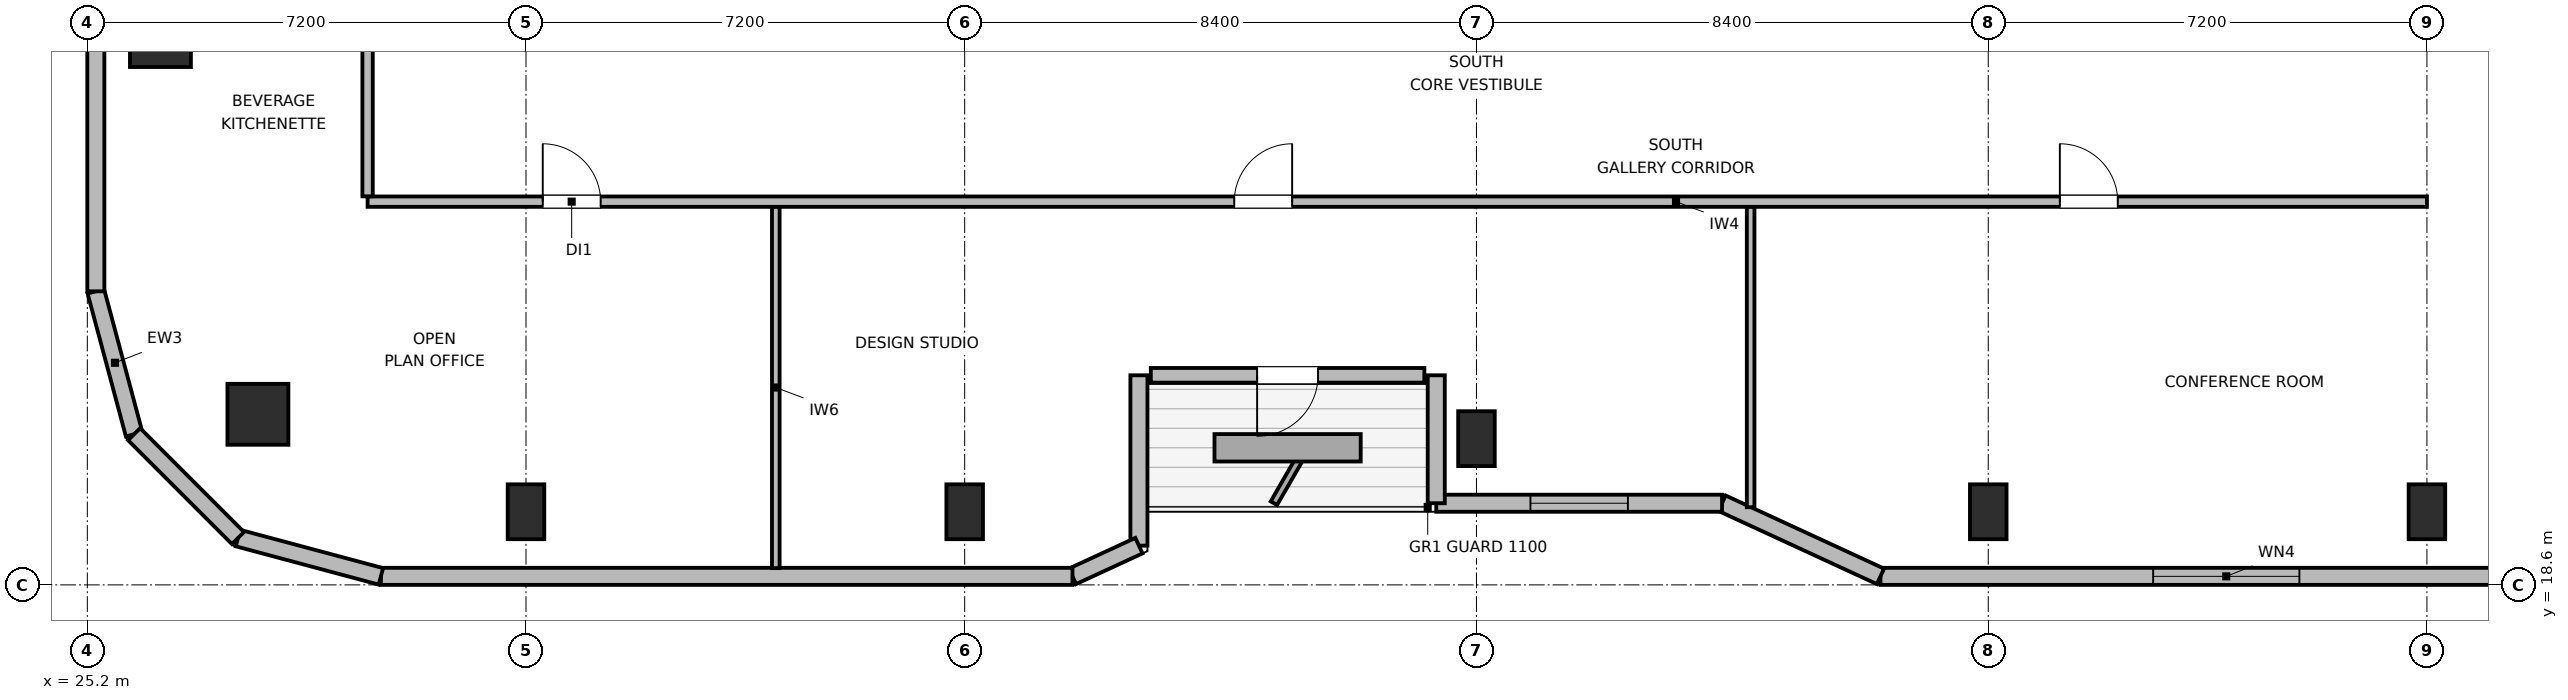
"""IFC4 building model, lengths in metres.
Left out: names, types, materials, properties, quantities, classifications, styles, units other than length and angle.
Written with IfcOpenShell. Run it as: python <this file> out.ifc"""

import sys

from ifc_helpers import new_model, si_unit, direction, frame, frame_2d, origin, origin_2d, place, context, subcontext, project, spatial, rectangle, circle, extrude, element, fill, save


model = new_model("IFC4")
c1 = context("Model", 3, precision=1e-05, world=origin(), true_north=direction((0.0, 1.0)))
c2 = subcontext(c1, "Body", "Model", "MODEL_VIEW")
j1 = project(units=[si_unit("LENGTHUNIT", "METRE"), si_unit("PLANEANGLEUNIT", "RADIAN")], contexts=[c1])
p1 = place(None, origin())
s1 = spatial("IfcSite", under=j1, at=p1, CompositionType="ELEMENT")
p2 = place(p1, origin())
s2 = spatial("IfcBuilding", under=s1, at=p2, CompositionType="ELEMENT")
p3 = place(p2, frame((0.0, 0.0, 258.9)))
s3 = spatial("IfcBuildingStorey", under=s2, at=p3, CompositionType="ELEMENT", Elevation=258.9)
p4 = place(p3, frame((28.0, 21.4, 0.0), z_axis=(0.0, 0.0, 1.0), x_axis=(1.0, 0.0, 0.0)))
e1 = element("IfcColumn", 1, at=p4, inside=s3, PredefinedType="COLUMN", context=c2, shape_type="SweptSolid", body=[
    extrude(circle(Radius=0.5, at=origin_2d()), origin(), (0.0, 0.0, 1.0), 3.9),
])
for number, where, z_axis, x_axis in (
    (2, (32.4, 19.8, 0.0), (0.0, 0.0, 1.0), (1.0, 0.0, 0.0)),
    (3, (39.6, 19.8, 0.0), (0.0, 0.0, 1.0), (1.0, 0.0, 0.0)),
    (4, (48.0, 21.0, 0.0), (0.0, 0.0, 1.0), (1.0, 0.0, 0.0)),
    (5, (56.4, 19.8, 0.0), (0.0, 0.0, 1.0), (1.0, 0.0, 0.0)),
    (6, (63.6, 19.8, 0.0), (0.0, 0.0, 1.0), (1.0, 0.0, 0.0)),
):
    element("IfcColumn", number, at=place(p3, frame(where, z_axis=z_axis, x_axis=x_axis)), inside=s3, PredefinedType="COLUMN", context=c2, shape_type="SweptSolid", body=[
        extrude(rectangle(XDim=0.6, YDim=0.9, at=origin_2d()), origin(), (0.0, 0.0, 1.0), 3.9),
    ])
p5 = place(p3, frame((26.4, 27.6, 0.0), z_axis=(0.0, 0.0, 1.0), x_axis=(1.0, 0.0, 0.0)))
e7 = element("IfcColumn", 7, at=p5, inside=s3, PredefinedType="COLUMN", context=c2, shape_type="SweptSolid", body=[
    extrude(rectangle(XDim=1.0, YDim=1.0, at=origin_2d()), origin(), (0.0, 0.0, 1.0), 3.9),
])
p6 = place(p3, frame((25.969, 21.073, 0.0), z_axis=(0.0, 0.0, 1.0), x_axis=(-0.258751159445, 0.965944013639, 0.0)))
e8 = element("IfcWall", 8, at=p6, inside=s3, PredefinedType="SOLIDWALL", context=c2, shape_type="SweptSolid", body=[
    extrude(rectangle(XDim=2.429, YDim=0.28, at=frame_2d((1.214, 0.0))), origin(), (0.0, 0.0, 1.0), 3.68),
])
p7 = place(p3, frame((25.34, 23.418, 0.0), z_axis=(0.0, 0.0, 1.0), x_axis=(0.0, 1.0, 0.0)))
e9 = element("IfcWall", 9, at=p7, inside=s3, PredefinedType="SOLIDWALL", context=c2, shape_type="SweptSolid", body=[
    extrude(rectangle(XDim=5.842, YDim=0.28, at=frame_2d((2.921, 0.0))), origin(), (0.0, 0.0, 1.0), 3.68),
])
p8 = place(p3, frame((65.982, 18.74, 0.0), z_axis=(0.0, 0.0, 1.0), x_axis=(-1.0, 0.0, 0.0)))
e10 = element("IfcWall", 10, at=p8, inside=s3, PredefinedType="SOLIDWALL", context=c2, shape_type="SweptSolid", body=[
    extrude(rectangle(XDim=11.351, YDim=0.28, at=frame_2d((5.676, 0.0))), origin(), (0.0, 0.0, 1.0), 3.68),
])
p9 = place(p8, frame((4.475, 0.0, 0.85)))
e11 = element("IfcOpeningElement", 11, at=p9, cuts=e10, PredefinedType="OPENING", context=c2, shape_type="SweptSolid", body=[
    extrude(rectangle(XDim=2.4, YDim=1.15, at=frame_2d((1.2, 0.575))), frame((0.0, 0.15, 0.0), z_axis=(0.0, -1.0, 0.0), x_axis=(1.0, 0.0, 0.0)), (0.0, 0.0, 1.0), 0.3),
])
p10 = place(p3, frame((54.631, 18.74, 0.0), z_axis=(0.0, 0.0, 1.0), x_axis=(-0.907956889006, 0.419063584324, 0.0)))
e12 = element("IfcWall", 12, at=p10, inside=s3, PredefinedType="SOLIDWALL", context=c2, shape_type="SweptSolid", body=[
    extrude(rectangle(XDim=2.864, YDim=0.28, at=frame_2d((1.432, 0.0))), origin(), (0.0, 0.0, 1.0), 2.265),
])
p11 = place(p3, frame((52.031, 19.94, 0.0), z_axis=(0.0, 0.0, 1.0), x_axis=(-1.0, 0.0, 0.0)))
e13 = element("IfcWall", 13, at=p11, inside=s3, PredefinedType="SOLIDWALL", context=c2, shape_type="SweptSolid", body=[
    extrude(rectangle(XDim=4.691, YDim=0.28, at=frame_2d((2.345, 0.0))), origin(), (0.0, 0.0, 1.0), 2.265),
])
p12 = place(p11, frame((1.545, 0.0, 0.85)))
e14 = element("IfcOpeningElement", 14, at=p12, cuts=e13, PredefinedType="OPENING", context=c2, shape_type="SweptSolid", body=[
    extrude(rectangle(XDim=1.6, YDim=1.0, at=frame_2d((0.8, 0.5))), frame((0.0, 0.15, 0.0), z_axis=(0.0, -1.0, 0.0), x_axis=(1.0, 0.0, 0.0)), (0.0, 0.0, 1.0), 0.3),
])
p13 = place(p3, frame((47.34, 19.94, 0.0), z_axis=(0.0, 0.0, 1.0), x_axis=(0.0, 1.0, 0.0)))
e15 = element("IfcWall", 15, at=p13, inside=s3, PredefinedType="SOLIDWALL", context=c2, shape_type="SweptSolid", body=[
    extrude(rectangle(XDim=2.1, YDim=0.28, at=frame_2d((1.05, 0.0))), origin(), (0.0, 0.0, 1.0), 2.265),
])
p14 = place(p3, frame((47.145, 22.04, 0.0), z_axis=(0.0, 0.0, 1.0), x_axis=(-1.0, 0.0, 0.0)))
e16 = element("IfcWall", 16, at=p14, inside=s3, PredefinedType="SOLIDWALL", context=c2, shape_type="SweptSolid", body=[
    extrude(rectangle(XDim=4.49, YDim=0.24, at=frame_2d((2.245, 0.0))), origin(), (0.0, 0.0, 1.0), 3.68),
])
p15 = place(p14, frame((1.745, 0.0, 0.0)))
e17 = element("IfcOpeningElement", 17, at=p15, cuts=e16, PredefinedType="OPENING", context=c2, shape_type="SweptSolid", body=[
    extrude(rectangle(XDim=1.0, YDim=2.02, at=frame_2d((0.5, 1.01))), frame((0.0, 0.13, 0.0), z_axis=(0.0, -1.0, 0.0), x_axis=(1.0, 0.0, 0.0)), (0.0, 0.0, 1.0), 0.26),
])
p16 = place(p3, frame((42.46, 22.04, 0.0), z_axis=(0.0, 0.0, 1.0), x_axis=(0.0, -1.0, 0.0)))
e18 = element("IfcWall", 18, at=p16, inside=s3, PredefinedType="SOLIDWALL", context=c2, shape_type="SweptSolid", body=[
    extrude(rectangle(XDim=2.796, YDim=0.28, at=frame_2d((1.398, 0.0))), origin(), (0.0, 0.0, 1.0), 2.265),
])
p17 = place(p3, frame((42.46, 19.244, 0.0), z_axis=(0.0, 0.0, 1.0), x_axis=(-0.907893953211, -0.419199916176, 0.0)))
e19 = element("IfcWall", 19, at=p17, inside=s3, PredefinedType="SOLIDWALL", context=c2, shape_type="SweptSolid", body=[
    extrude(rectangle(XDim=1.201, YDim=0.28, at=frame_2d((0.601, 0.0))), origin(), (0.0, 0.0, 1.0), 3.68),
])
p18 = place(p3, frame((41.369, 18.74, 0.0), z_axis=(0.0, 0.0, 1.0), x_axis=(-1.0, 0.0, 0.0)))
e20 = element("IfcWall", 20, at=p18, inside=s3, PredefinedType="SOLIDWALL", context=c2, shape_type="SweptSolid", body=[
    extrude(rectangle(XDim=11.351, YDim=0.28, at=frame_2d((5.675, 0.0))), origin(), (0.0, 0.0, 1.0), 3.68),
])
p19 = place(p3, frame((30.018, 18.74, 0.0), z_axis=(0.0, 0.0, 1.0), x_axis=(-0.965937282298, 0.25877628691, 0.0)))
e21 = element("IfcWall", 21, at=p19, inside=s3, PredefinedType="SOLIDWALL", context=c2, shape_type="SweptSolid", body=[
    extrude(rectangle(XDim=2.428, YDim=0.28, at=frame_2d((1.214, 0.0))), origin(), (0.0, 0.0, 1.0), 3.68),
])
p20 = place(p3, frame((27.673, 19.368, 0.0), z_axis=(0.0, 0.0, 1.0), x_axis=(-0.707106781187, 0.707106781187, 0.0)))
e22 = element("IfcWall", 22, at=p20, inside=s3, PredefinedType="SOLIDWALL", context=c2, shape_type="SweptSolid", body=[
    extrude(rectangle(XDim=2.41, YDim=0.28, at=frame_2d((1.205, 0.0))), origin(), (0.0, 0.0, 1.0), 3.68),
])
p21 = place(p3, frame((29.8, 24.89, 0.0), z_axis=(0.0, 0.0, 1.0), x_axis=(1.0, 0.0, 0.0)))
e23 = element("IfcWall", 23, at=p21, inside=s3, PredefinedType="PARTITIONING", context=c2, shape_type="SweptSolid", body=[
    extrude(rectangle(XDim=33.8, YDim=0.17, at=frame_2d((16.9, 0.0))), origin(), (0.0, 0.0, 1.0), 3.68),
])
p22 = place(p21, frame((2.875, 0.0, 0.0)))
e24 = element("IfcOpeningElement", 24, at=p22, cuts=e23, PredefinedType="OPENING", context=c2, shape_type="SweptSolid", body=[
    extrude(rectangle(XDim=0.95, YDim=2.04, at=frame_2d((0.475, 1.02))), frame((0.0, 0.095, 0.0), z_axis=(0.0, -1.0, 0.0), x_axis=(1.0, 0.0, 0.0)), (0.0, 0.0, 1.0), 0.19),
])
p23 = place(p21, frame((14.225, 0.0, 0.0)))
e25 = element("IfcOpeningElement", 25, at=p23, cuts=e23, PredefinedType="OPENING", context=c2, shape_type="SweptSolid", body=[
    extrude(rectangle(XDim=0.95, YDim=2.04, at=frame_2d((0.475, 1.02))), frame((0.0, 0.095, 0.0), z_axis=(0.0, -1.0, 0.0), x_axis=(1.0, 0.0, 0.0)), (0.0, 0.0, 1.0), 0.19),
])
p24 = place(p21, frame((27.775, 0.0, 0.0)))
e26 = element("IfcOpeningElement", 26, at=p24, cuts=e23, PredefinedType="OPENING", context=c2, shape_type="SweptSolid", body=[
    extrude(rectangle(XDim=0.95, YDim=2.04, at=frame_2d((0.475, 1.02))), frame((0.0, 0.095, 0.0), z_axis=(0.0, -1.0, 0.0), x_axis=(1.0, 0.0, 0.0)), (0.0, 0.0, 1.0), 0.19),
])
p25 = place(p3, frame((29.8, 24.977, 0.0), z_axis=(0.0, 0.0, 1.0), x_axis=(0.0, 1.0, 0.0)))
e27 = element("IfcWall", 27, at=p25, inside=s3, PredefinedType="PARTITIONING", context=c2, shape_type="SweptSolid", body=[
    extrude(rectangle(XDim=22.046, YDim=0.17, at=frame_2d((11.023, 0.0))), origin(), (0.0, 0.0, 1.0), 3.68),
])
p26 = place(p25, frame((3.693, 0.0, 0.0)))
e28 = element("IfcOpeningElement", 28, at=p26, cuts=e27, PredefinedType="OPENING", context=c2, shape_type="SweptSolid", body=[
    extrude(rectangle(XDim=0.95, YDim=2.04, at=frame_2d((0.475, 1.02))), frame((0.0, 0.095, 0.0), z_axis=(0.0, -1.0, 0.0), x_axis=(1.0, 0.0, 0.0)), (0.0, 0.0, 1.0), 0.19),
])
p27 = place(p25, frame((11.148, 0.0, 0.0)))
e29 = element("IfcOpeningElement", 29, at=p27, cuts=e27, PredefinedType="OPENING", context=c2, shape_type="SweptSolid", body=[
    extrude(rectangle(XDim=0.95, YDim=2.04, at=frame_2d((0.475, 1.02))), frame((0.0, 0.095, 0.0), z_axis=(0.0, -1.0, 0.0), x_axis=(1.0, 0.0, 0.0)), (0.0, 0.0, 1.0), 0.19),
])
p28 = place(p25, frame((18.003, 0.0, 0.0)))
e30 = element("IfcOpeningElement", 30, at=p28, cuts=e27, PredefinedType="OPENING", context=c2, shape_type="SweptSolid", body=[
    extrude(rectangle(XDim=0.95, YDim=2.04, at=frame_2d((0.475, 1.02))), frame((0.0, 0.095, 0.0), z_axis=(0.0, -1.0, 0.0), x_axis=(1.0, 0.0, 0.0)), (0.0, 0.0, 1.0), 0.19),
])
p29 = place(p3, frame((36.5, 18.875, 0.0), z_axis=(0.0, 0.0, 1.0), x_axis=(0.0, 1.0, 0.0)))
e31 = element("IfcWall", 31, at=p29, inside=s3, PredefinedType="PARTITIONING", context=c2, shape_type="SweptSolid", body=[
    extrude(rectangle(XDim=5.928, YDim=0.125, at=frame_2d((2.964, 0.0))), origin(), (0.0, 0.0, 1.0), 3.68),
])
p30 = place(p3, frame((52.5, 19.875, 0.0), z_axis=(0.0, 0.0, 1.0), x_axis=(0.0, 1.0, 0.0)))
e32 = element("IfcWall", 32, at=p30, inside=s3, PredefinedType="PARTITIONING", context=c2, shape_type="SweptSolid", body=[
    extrude(rectangle(XDim=4.928, YDim=0.125, at=frame_2d((2.464, 0.0))), origin(), (0.0, 0.0, 1.0), 3.043),
])
p31 = place(p9, origin())
e33 = element("IfcWindow", 33, at=p31, inside=s3, PartitioningType="SINGLE_PANEL", PredefinedType="WINDOW", context=c2, shape_type="SweptSolid", body=[
    extrude(rectangle(XDim=2.4, YDim=1.15, at=frame_2d((1.2, 0.575))), frame((0.0, 0.03, 0.0), z_axis=(0.0, -1.0, 0.0), x_axis=(1.0, 0.0, 0.0)), (0.0, 0.0, 1.0), 0.06),
])
fill(e11, e33)
p32 = place(p12, origin())
e34 = element("IfcWindow", 34, at=p32, inside=s3, PartitioningType="SINGLE_PANEL", PredefinedType="WINDOW", context=c2, shape_type="SweptSolid", body=[
    extrude(rectangle(XDim=1.6, YDim=1.0, at=frame_2d((0.8, 0.5))), frame((0.0, 0.03, 0.0), z_axis=(0.0, -1.0, 0.0), x_axis=(1.0, 0.0, 0.0)), (0.0, 0.0, 1.0), 0.06),
])
fill(e14, e34)
p33 = place(p15, origin())
e35 = element("IfcDoor", 35, at=p33, inside=s3, OperationType="SINGLE_SWING_RIGHT", PredefinedType="DOOR", context=c2, shape_type="SweptSolid", body=[
    extrude(rectangle(XDim=1.0, YDim=2.02, at=frame_2d((0.5, 1.01))), frame((0.0, 0.025, 0.0), z_axis=(0.0, -1.0, 0.0), x_axis=(1.0, 0.0, 0.0)), (0.0, 0.0, 1.0), 0.05),
])
fill(e17, e35)
p34 = place(p22, origin())
e36 = element("IfcDoor", 36, at=p34, inside=s3, OperationType="SINGLE_SWING_LEFT", PredefinedType="DOOR", context=c2, shape_type="SweptSolid", body=[
    extrude(rectangle(XDim=0.95, YDim=2.04, at=frame_2d((0.475, 1.02))), frame((0.0, 0.025, 0.0), z_axis=(0.0, -1.0, 0.0), x_axis=(1.0, 0.0, 0.0)), (0.0, 0.0, 1.0), 0.05),
])
fill(e24, e36)
p35 = place(p23, origin())
e37 = element("IfcDoor", 37, at=p35, inside=s3, OperationType="SINGLE_SWING_RIGHT", PredefinedType="DOOR", context=c2, shape_type="SweptSolid", body=[
    extrude(rectangle(XDim=0.95, YDim=2.04, at=frame_2d((0.475, 1.02))), frame((0.0, 0.025, 0.0), z_axis=(0.0, -1.0, 0.0), x_axis=(1.0, 0.0, 0.0)), (0.0, 0.0, 1.0), 0.05),
])
fill(e25, e37)
p36 = place(p24, origin())
e38 = element("IfcDoor", 38, at=p36, inside=s3, OperationType="SINGLE_SWING_LEFT", PredefinedType="DOOR", context=c2, shape_type="SweptSolid", body=[
    extrude(rectangle(XDim=0.95, YDim=2.04, at=frame_2d((0.475, 1.02))), frame((0.0, 0.025, 0.0), z_axis=(0.0, -1.0, 0.0), x_axis=(1.0, 0.0, 0.0)), (0.0, 0.0, 1.0), 0.05),
])
fill(e26, e38)
save(model, sys.argv[1])
